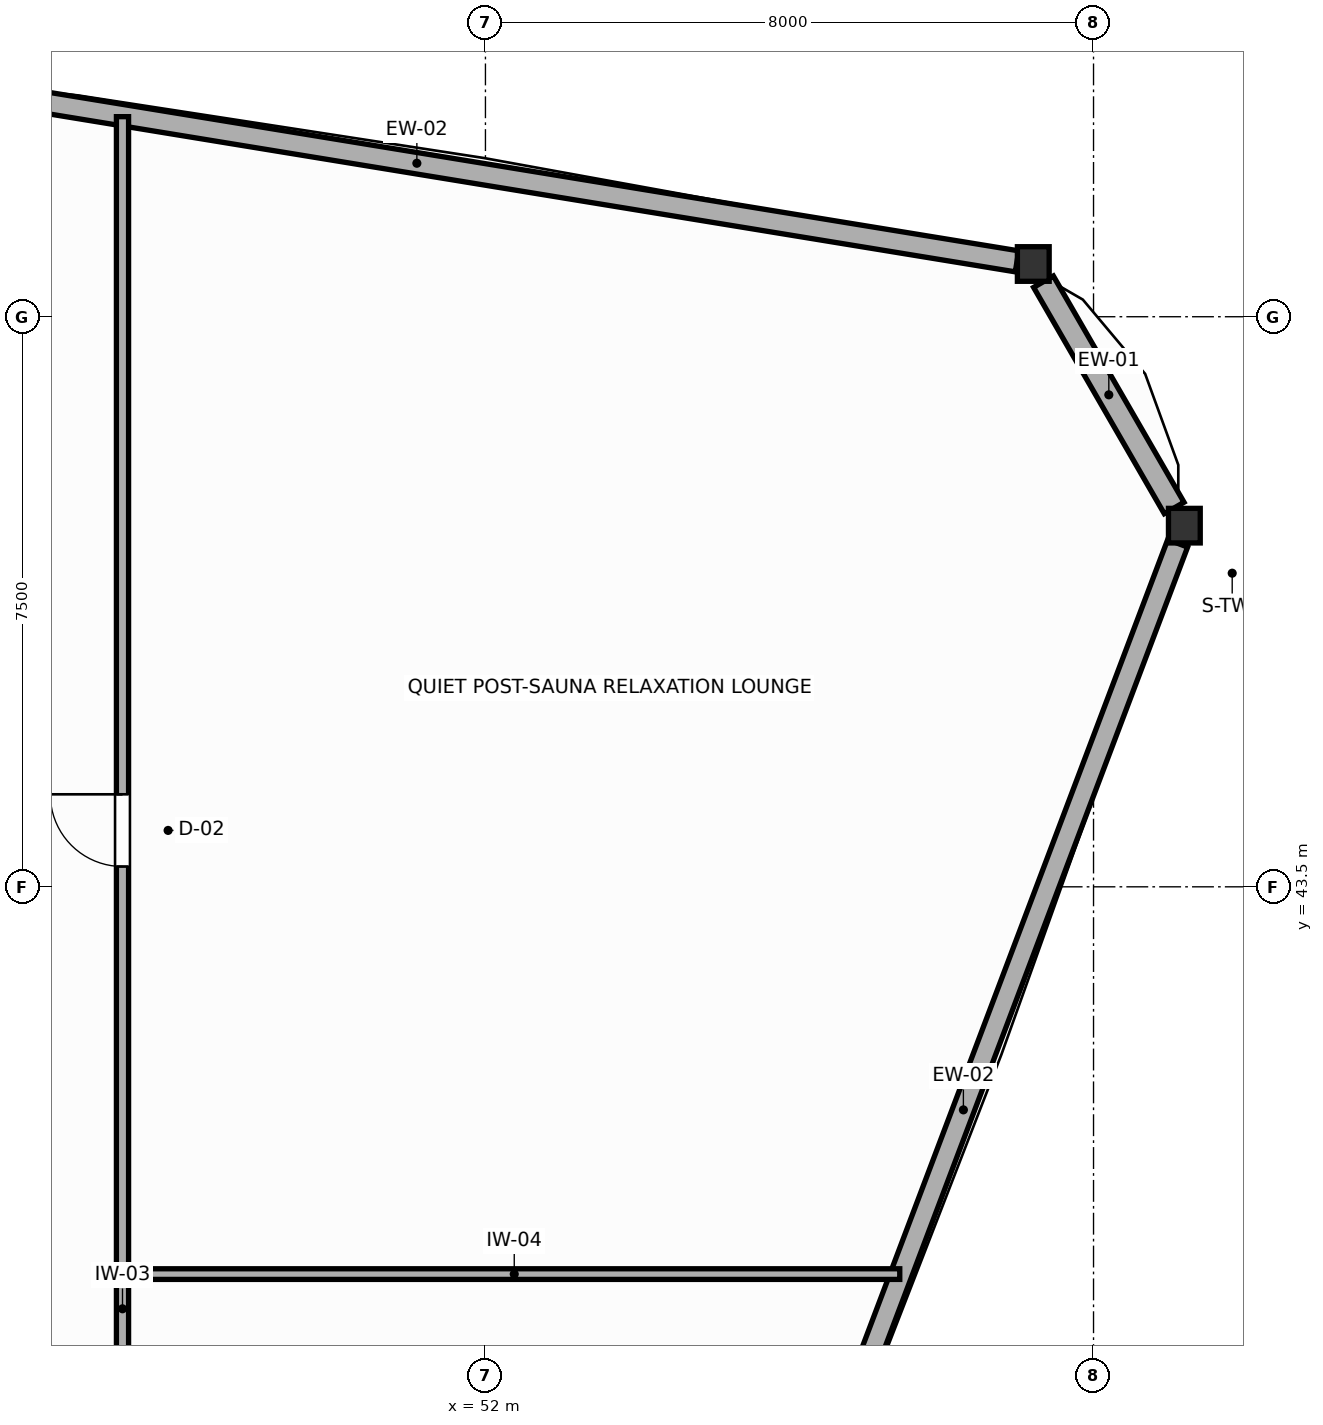
"""IFC4 building model, lengths in metres.
Left out: names, types, materials, properties, quantities, classifications, styles, units other than length and angle.
Written with IfcOpenShell. Run it as: python <this file> out.ifc"""

import sys

from ifc_helpers import new_model, si_unit, direction, frame, frame_2d, origin, origin_2d, place, context, subcontext, project, spatial, rectangle, i_section, extrude, source, transform, mapped, element, fill, save


model = new_model("IFC4")
c1 = context("Model", 3, precision=1e-05, world=origin(), true_north=direction((0.0, 1.0)))
c2 = subcontext(c1, "Body", "Model", "MODEL_VIEW")
j1 = project(units=[si_unit("LENGTHUNIT", "METRE"), si_unit("PLANEANGLEUNIT", "RADIAN")], contexts=[c1])
p1 = place(None, origin())
s1 = spatial("IfcSite", under=j1, at=p1, CompositionType="ELEMENT")
p2 = place(p1, origin())
s2 = spatial("IfcBuilding", under=s1, at=p2, CompositionType="ELEMENT")
p3 = place(p2, frame((0.0, 0.0, 109.8)))
s3 = spatial("IfcBuildingStorey", under=s2, at=p3, CompositionType="ELEMENT", Elevation=109.8)
m1 = source(origin(), c2, "Body", "SweptSolid", [
    extrude(i_section(OverallWidth=0.418, OverallDepth=0.455, WebThickness=0.039, FlangeThickness=0.063, FilletRadius=0.015, at=origin_2d()), origin(), (0.0, 0.0, 1.0), 3.6),
])
for number, where, z_axis, x_axis in (
    (1, (61.195, 48.251, 0.0), (0.0, 0.0, 1.0), (1.0, 0.0, 0.0)),
    (2, (59.208, 51.694, 0.0), (0.0, 0.0, 1.0), (1.0, 0.0, 0.0)),
):
    element("IfcColumn", number, at=place(p3, frame(where, z_axis=z_axis, x_axis=x_axis)), inside=s3, PredefinedType="COLUMN", context=c2, shape_type="MappedRepresentation", body=[
        mapped(m1, transform((0.0, 0.0, 0.0), scale=1.0)),
    ])
p4 = place(p3, frame((61.061, 48.484, 0.0), z_axis=(0.0, 0.0, 1.0), x_axis=(-0.500064626416, 0.86598808849, 0.0)))
e3 = element("IfcWall", 3, at=p4, inside=s3, PredefinedType="SOLIDWALL", context=c2, shape_type="SweptSolid", body=[
    extrude(rectangle(XDim=3.438, YDim=0.3, at=frame_2d((1.719, 0.0))), origin(), (0.0, 0.0, 1.0), 1.87),
])
p5 = place(p3, frame((58.993, 51.729, 0.0), z_axis=(0.0, 0.0, 1.0), x_axis=(-0.98690696995, 0.161290522546, 0.0)))
e4 = element("IfcWall", 4, at=p5, inside=s3, PredefinedType="SOLIDWALL", context=c2, shape_type="SweptSolid", body=[
    extrude(rectangle(XDim=16.001, YDim=0.28, at=frame_2d((8.0, 0.0))), origin(), (0.0, 0.0, 1.0), 1.87),
])
p6 = place(p3, frame((55.469, 33.112, 0.0), z_axis=(0.0, 0.0, 1.0), x_axis=(0.353771130195, 0.935332019895, 0.0)))
e5 = element("IfcWall", 5, at=p6, inside=s3, PredefinedType="SOLIDWALL", context=c2, shape_type="SweptSolid", body=[
    extrude(rectangle(XDim=15.937, YDim=0.28, at=frame_2d((7.969, 0.0))), origin(), (0.0, 0.0, 1.0), 1.87),
])
p7 = place(p3, frame((47.225, 32.31, 0.0), z_axis=(0.0, 0.0, 1.0), x_axis=(0.0, 1.0, 0.0)))
e6 = element("IfcWall", 6, at=p7, inside=s3, PredefinedType="PARTITIONING", context=c2, shape_type="SweptSolid", body=[
    extrude(rectangle(XDim=21.322, YDim=0.16, at=frame_2d((10.661, 0.0))), origin(), (0.0, 0.0, 1.0), 3.4),
])
p8 = place(p7, frame((11.457, 0.0, 0.0)))
e7 = element("IfcOpeningElement", 7, at=p8, cuts=e6, PredefinedType="OPENING", context=c2, shape_type="SweptSolid", body=[
    extrude(rectangle(XDim=0.95, YDim=2.05, at=frame_2d((0.475, 1.025))), frame((0.0, 0.09, 0.0), z_axis=(0.0, -1.0, 0.0), x_axis=(1.0, 0.0, 0.0)), (0.0, 0.0, 1.0), 0.18),
])
p9 = place(p3, frame((47.307, 38.405, 0.0), z_axis=(0.0, 0.0, 1.0), x_axis=(1.0, 0.0, 0.0)))
e8 = element("IfcWall", 8, at=p9, inside=s3, PredefinedType="PARTITIONING", context=c2, shape_type="SweptSolid", body=[
    extrude(rectangle(XDim=10.144, YDim=0.14, at=frame_2d((5.072, 0.0))), origin(), (0.0, 0.0, 1.0), 3.4),
])
p10 = place(p8, origin())
e9 = element("IfcDoor", 9, at=p10, inside=s3, OperationType="SINGLE_SWING_RIGHT", PredefinedType="DOOR", context=c2, shape_type="SweptSolid", body=[
    extrude(rectangle(XDim=0.95, YDim=2.05, at=frame_2d((0.475, 1.025))), frame((0.0, 0.025, 0.0), z_axis=(0.0, -1.0, 0.0), x_axis=(1.0, 0.0, 0.0)), (0.0, 0.0, 1.0), 0.05),
])
fill(e7, e9)
save(model, sys.argv[1])
